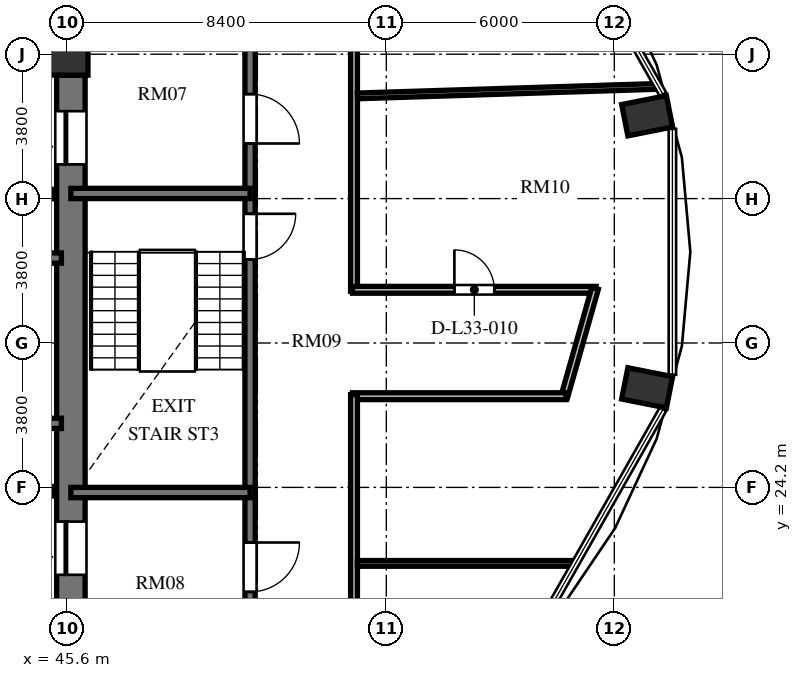
"""IFC4 building model, lengths in metres.
Left out: names, types, materials, properties, quantities, classifications, styles, units other than length and angle.
Written with IfcOpenShell. Run it as: python <this file> out.ifc"""

import sys

from ifc_helpers import new_model, si_unit, direction, frame, frame_2d, origin, origin_2d, place, context, subcontext, project, spatial, rectangle, extrude, element, fill, save


model = new_model("IFC4")
c1 = context("Model", 3, precision=1e-05, world=origin(), true_north=direction((0.0, 1.0)))
c2 = subcontext(c1, "Body", "Model", "MODEL_VIEW")
j1 = project(units=[si_unit("LENGTHUNIT", "METRE"), si_unit("PLANEANGLEUNIT", "RADIAN")], contexts=[c1])
p1 = place(None, origin())
s1 = spatial("IfcSite", under=j1, at=p1, CompositionType="ELEMENT")
p2 = place(p1, origin())
s2 = spatial("IfcBuilding", under=s1, at=p2, CompositionType="ELEMENT")
p3 = place(p2, frame((0.0, 0.0, 129.168)))
s3 = spatial("IfcBuildingStorey", under=s2, at=p3, CompositionType="ELEMENT", Elevation=129.168)
for number, where, z_axis, x_axis in (
    (1, (60.863, 26.82, 0.0), (0.0, 0.0, 1.0), (0.981, -0.195, 0.0)),
    (2, (60.863, 33.98, 0.0), (0.0, 0.0, 1.0), (0.981, 0.195, 0.0)),
):
    element("IfcColumn", number, at=place(p3, frame(where, z_axis=z_axis, x_axis=x_axis)), inside=s3, PredefinedType="COLUMN", context=c2, shape_type="SweptSolid", body=[
        extrude(rectangle(XDim=1.2, YDim=0.84, at=origin_2d()), origin(), (0.0, 0.0, 1.0), 3.648),
    ])
p4 = place(p3, frame((45.6, 35.6, 0.0), z_axis=(0.0, 0.0, 1.0), x_axis=(1.0, 0.0, 0.0)))
e3 = element("IfcColumn", 3, at=p4, inside=s3, PredefinedType="COLUMN", context=c2, shape_type="SweptSolid", body=[
    extrude(rectangle(XDim=1.1, YDim=1.1, at=origin_2d()), origin(), (0.0, 0.0, 1.0), 3.648),
])
p5 = place(p3, frame((45.7, 20.95, 0.0), z_axis=(0.0, 0.0, 1.0), x_axis=(0.0, 1.0, 0.0)))
e4 = element("IfcWall", 4, at=p5, inside=s3, PredefinedType="SHEAR", context=c2, shape_type="SweptSolid", body=[
    extrude(rectangle(XDim=14.1, YDim=0.75, at=frame_2d((7.05, 0.0))), origin(), (0.0, 0.0, 1.0), 3.648),
])
p6 = place(p5, frame((11.75, 0.0, 0.0)))
e5 = element("IfcOpeningElement", 5, at=p6, cuts=e4, PredefinedType="OPENING", context=c2, shape_type="SweptSolid", body=[
    extrude(rectangle(XDim=1.4, YDim=2.3, at=frame_2d((0.7, 1.15))), frame((0.0, 0.385, 0.0), z_axis=(0.0, -1.0, 0.0), x_axis=(1.0, 0.0, 0.0)), (0.0, 0.0, 1.0), 0.77),
])
p7 = place(p5, frame((0.95, 0.0, 0.0)))
e6 = element("IfcOpeningElement", 6, at=p7, cuts=e4, PredefinedType="OPENING", context=c2, shape_type="SweptSolid", body=[
    extrude(rectangle(XDim=1.4, YDim=2.3, at=frame_2d((0.7, 1.15))), frame((0.0, 0.385, 0.0), z_axis=(0.0, -1.0, 0.0), x_axis=(1.0, 0.0, 0.0)), (0.0, 0.0, 1.0), 0.77),
])
p8 = place(p3, frame((37.465, 30.235, 0.0), z_axis=(0.0, 0.0, 1.0), x_axis=(1.0, 0.0, 0.0)))
e7 = element("IfcWall", 7, at=p8, inside=s3, PredefinedType="SHEAR", context=c2, shape_type="SweptSolid", body=[
    extrude(rectangle(XDim=7.985, YDim=0.27, at=frame_2d((3.992, 0.0))), origin(), (0.0, 0.0, 1.0), 3.648),
])
p9 = place(p8, frame((6.455, 0.0, 0.0)))
e8 = element("IfcOpeningElement", 8, at=p9, cuts=e7, PredefinedType="OPENING", context=c2, shape_type="SweptSolid", body=[
    extrude(rectangle(XDim=1.2, YDim=2.15, at=frame_2d((0.6, 1.075))), frame((0.0, 0.145, 0.0), z_axis=(0.0, -1.0, 0.0), x_axis=(1.0, 0.0, 0.0)), (0.0, 0.0, 1.0), 0.29),
])
p10 = place(p3, frame((37.465, 25.885, 0.0), z_axis=(0.0, 0.0, 1.0), x_axis=(1.0, 0.0, 0.0)))
e9 = element("IfcWall", 9, at=p10, inside=s3, PredefinedType="SHEAR", context=c2, shape_type="SweptSolid", body=[
    extrude(rectangle(XDim=7.985, YDim=0.27, at=frame_2d((3.992, 0.0))), origin(), (0.0, 0.0, 1.0), 3.648),
])
for number, where, z_axis, x_axis in (
    (10, (42.95, 31.92, 0.0), (0.0, 0.0, 1.0), (1.0, 0.0, 0.0)),
    (11, (42.95, 24.1, 0.0), (0.0, 0.0, 1.0), (1.0, 0.0, 0.0)),
):
    element("IfcWall", number, at=place(p3, frame(where, z_axis=z_axis, x_axis=x_axis)), inside=s3, PredefinedType="SOLIDWALL", context=c2, shape_type="SweptSolid", body=[
        extrude(rectangle(XDim=2.3, YDim=0.25, at=frame_2d((1.15, 0.0))), origin(), (0.0, 0.0, 1.0), 3.198),
    ])
p11 = place(p3, frame((50.415, 35.845, 0.0), z_axis=(0.0, 0.0, 1.0), x_axis=(0.0, -1.0, 0.0)))
e12 = element("IfcWall", 12, at=p11, inside=s3, PredefinedType="SHEAR", context=c2, shape_type="SweptSolid", body=[
    extrude(rectangle(XDim=15.825, YDim=0.27, at=frame_2d((7.913, 0.0))), origin(), (0.0, 0.0, 1.0), 3.648),
])
p12 = place(p11, frame((4.445, 0.0, 0.0)))
e13 = element("IfcOpeningElement", 13, at=p12, cuts=e12, PredefinedType="OPENING", context=c2, shape_type="SweptSolid", body=[
    extrude(rectangle(XDim=1.2, YDim=2.15, at=frame_2d((0.6, 1.075))), frame((0.0, 0.145, 0.0), z_axis=(0.0, -1.0, 0.0), x_axis=(1.0, 0.0, 0.0)), (0.0, 0.0, 1.0), 0.29),
])
p13 = place(p11, frame((1.295, 0.0, 0.0)))
e14 = element("IfcOpeningElement", 14, at=p13, cuts=e12, PredefinedType="OPENING", context=c2, shape_type="SweptSolid", body=[
    extrude(rectangle(XDim=1.3, YDim=2.2, at=frame_2d((0.65, 1.1))), frame((0.0, 0.145, 0.0), z_axis=(0.0, -1.0, 0.0), x_axis=(1.0, 0.0, 0.0)), (0.0, 0.0, 1.0), 0.29),
])
p14 = place(p11, frame((13.095, 0.0, 0.0)))
e15 = element("IfcOpeningElement", 15, at=p14, cuts=e12, PredefinedType="OPENING", context=c2, shape_type="SweptSolid", body=[
    extrude(rectangle(XDim=1.3, YDim=2.2, at=frame_2d((0.65, 1.1))), frame((0.0, 0.145, 0.0), z_axis=(0.0, -1.0, 0.0), x_axis=(1.0, 0.0, 0.0)), (0.0, 0.0, 1.0), 0.29),
])
for number, where, z_axis, x_axis in (
    (16, (45.7, 31.935, 0.0), (0.0, 0.0, 1.0), (1.0, 0.0, 0.0)),
    (17, (45.7, 24.065, 0.0), (0.0, 0.0, 1.0), (1.0, 0.0, 0.0)),
):
    element("IfcWall", number, at=place(p3, frame(where, z_axis=z_axis, x_axis=x_axis)), inside=s3, PredefinedType="SHEAR", context=c2, shape_type="SweptSolid", body=[
        extrude(rectangle(XDim=4.715, YDim=0.27, at=frame_2d((2.357, 0.0))), origin(), (0.0, 0.0, 1.0), 3.648),
    ])
p15 = place(p3, frame((53.15, 38.79, 0.0), z_axis=(0.0, 0.0, 1.0), x_axis=(0.0, -1.0, 0.0)))
e18 = element("IfcWall", 18, at=p15, inside=s3, PredefinedType="PARTITIONING", context=c2, shape_type="SweptSolid", body=[
    extrude(rectangle(XDim=9.43, YDim=0.18, at=frame_2d((4.715, 0.0))), origin(), (0.0, 0.0, 1.0), 3.198),
])
p16 = place(p3, frame((53.11, 29.4, 0.0), z_axis=(0.0, 0.0, 1.0), x_axis=(1.0, 0.0, 0.0)))
e19 = element("IfcWall", 19, at=p16, inside=s3, PredefinedType="PARTITIONING", context=c2, shape_type="SweptSolid", body=[
    extrude(rectangle(XDim=6.413, YDim=0.18, at=frame_2d((3.206, 0.0))), origin(), (0.0, 0.0, 1.0), 3.198),
])
p17 = place(p16, frame((2.681, 0.0, 0.0)))
e20 = element("IfcOpeningElement", 20, at=p17, cuts=e19, PredefinedType="OPENING", context=c2, shape_type="SweptSolid", body=[
    extrude(rectangle(XDim=1.05, YDim=2.15, at=frame_2d((0.525, 1.075))), frame((0.0, 0.1, 0.0), z_axis=(0.0, -1.0, 0.0), x_axis=(1.0, 0.0, 0.0)), (0.0, 0.0, 1.0), 0.2),
])
p18 = place(p3, frame((59.494, 29.438, 0.0), z_axis=(0.0, 0.0, 1.0), x_axis=(-0.273222154729, -0.961950962453, 0.0)))
e21 = element("IfcWall", 21, at=p18, inside=s3, PredefinedType="PARTITIONING", context=c2, shape_type="SweptSolid", body=[
    extrude(rectangle(XDim=2.991, YDim=0.18, at=frame_2d((1.495, 0.0))), origin(), (0.0, 0.0, 1.0), 3.198),
])
p19 = place(p3, frame((58.727, 26.6, 0.0), z_axis=(0.0, 0.0, 1.0), x_axis=(-1.0, 0.0, 0.0)))
e22 = element("IfcWall", 22, at=p19, inside=s3, PredefinedType="PARTITIONING", context=c2, shape_type="SweptSolid", body=[
    extrude(rectangle(XDim=5.617, YDim=0.18, at=frame_2d((2.809, 0.0))), origin(), (0.0, 0.0, 1.0), 3.198),
])
p20 = place(p3, frame((53.15, 26.64, 0.0), z_axis=(0.0, 0.0, 1.0), x_axis=(0.0, -1.0, 0.0)))
e23 = element("IfcWall", 23, at=p20, inside=s3, PredefinedType="PARTITIONING", context=c2, shape_type="SweptSolid", body=[
    extrude(rectangle(XDim=6.66, YDim=0.18, at=frame_2d((3.33, 0.0))), origin(), (0.0, 0.0, 1.0), 3.198),
])
p21 = place(p3, frame((53.24, 22.2, 0.0), z_axis=(0.0, 0.0, 1.0), x_axis=(1.0, 0.0, 0.0)))
e24 = element("IfcWall", 24, at=p21, inside=s3, PredefinedType="PARTITIONING", context=c2, shape_type="SweptSolid", body=[
    extrude(rectangle(XDim=5.731, YDim=0.15, at=frame_2d((2.866, 0.0))), origin(), (0.0, 0.0, 1.0), 3.198),
])
p22 = place(p3, frame((53.24, 34.502, 0.0), z_axis=(0.0, 0.0, 1.0), x_axis=(0.999499445349, 0.031636351679, 0.0)))
e25 = element("IfcWall", 25, at=p22, inside=s3, PredefinedType="PARTITIONING", context=c2, shape_type="SweptSolid", body=[
    extrude(rectangle(XDim=7.933, YDim=0.15, at=frame_2d((3.967, 0.0))), origin(), (0.0, 0.0, 1.0), 2.583),
])
p23 = place(p6, origin())
e26 = element("IfcDoor", 26, at=p23, inside=s3, OperationType="SLIDING_TO_LEFT", PredefinedType="DOOR", context=c2, shape_type="SweptSolid", body=[
    extrude(rectangle(XDim=1.4, YDim=2.3, at=frame_2d((0.7, 1.15))), frame((0.0, 0.025, 0.0), z_axis=(0.0, -1.0, 0.0), x_axis=(1.0, 0.0, 0.0)), (0.0, 0.0, 1.0), 0.05),
])
fill(e5, e26)
p24 = place(p7, origin())
e27 = element("IfcDoor", 27, at=p24, inside=s3, OperationType="SLIDING_TO_LEFT", PredefinedType="DOOR", context=c2, shape_type="SweptSolid", body=[
    extrude(rectangle(XDim=1.4, YDim=2.3, at=frame_2d((0.7, 1.15))), frame((0.0, 0.025, 0.0), z_axis=(0.0, -1.0, 0.0), x_axis=(1.0, 0.0, 0.0)), (0.0, 0.0, 1.0), 0.05),
])
fill(e6, e27)
p25 = place(p12, origin())
e28 = element("IfcDoor", 28, at=p25, inside=s3, OperationType="SINGLE_SWING_LEFT", PredefinedType="DOOR", context=c2, shape_type="SweptSolid", body=[
    extrude(rectangle(XDim=1.2, YDim=2.15, at=frame_2d((0.6, 1.075))), frame((0.0, 0.025, 0.0), z_axis=(0.0, -1.0, 0.0), x_axis=(1.0, 0.0, 0.0)), (0.0, 0.0, 1.0), 0.05),
])
fill(e13, e28)
p26 = place(p13, origin())
e29 = element("IfcDoor", 29, at=p26, inside=s3, OperationType="SINGLE_SWING_RIGHT", PredefinedType="DOOR", context=c2, shape_type="SweptSolid", body=[
    extrude(rectangle(XDim=1.3, YDim=2.2, at=frame_2d((0.65, 1.1))), frame((0.0, 0.025, 0.0), z_axis=(0.0, -1.0, 0.0), x_axis=(1.0, 0.0, 0.0)), (0.0, 0.0, 1.0), 0.05),
])
fill(e14, e29)
p27 = place(p14, origin())
e30 = element("IfcDoor", 30, at=p27, inside=s3, OperationType="SINGLE_SWING_LEFT", PredefinedType="DOOR", context=c2, shape_type="SweptSolid", body=[
    extrude(rectangle(XDim=1.3, YDim=2.2, at=frame_2d((0.65, 1.1))), frame((0.0, 0.025, 0.0), z_axis=(0.0, -1.0, 0.0), x_axis=(1.0, 0.0, 0.0)), (0.0, 0.0, 1.0), 0.05),
])
fill(e15, e30)
p28 = place(p17, origin())
e31 = element("IfcDoor", 31, at=p28, inside=s3, OperationType="SINGLE_SWING_LEFT", PredefinedType="DOOR", context=c2, shape_type="SweptSolid", body=[
    extrude(rectangle(XDim=1.05, YDim=2.15, at=frame_2d((0.525, 1.075))), frame((0.0, 0.025, 0.0), z_axis=(0.0, -1.0, 0.0), x_axis=(1.0, 0.0, 0.0)), (0.0, 0.0, 1.0), 0.05),
])
fill(e20, e31)
save(model, sys.argv[1])
